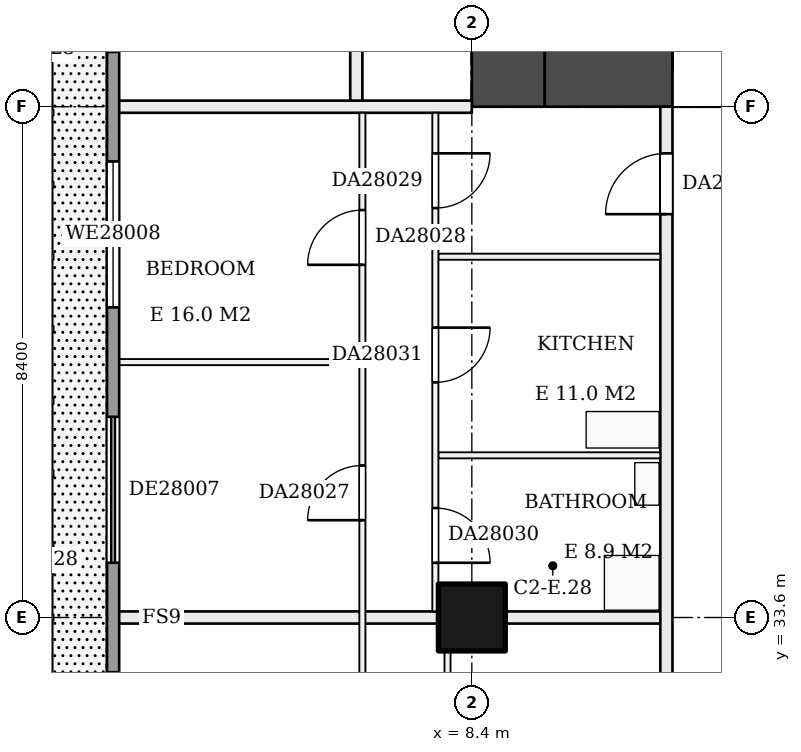
"""IFC4 building model, lengths in metres.
Left out: names, types, materials, properties, quantities, classifications, styles, units other than length and angle.
Written with IfcOpenShell. Run it as: python <this file> out.ifc"""

import sys

from ifc_helpers import new_model, si_unit, direction, frame, frame_2d, origin, origin_2d, place, context, subcontext, project, spatial, rectangle, extrude, element, fill, save


model = new_model("IFC4")
c1 = context("Model", 3, precision=1e-05, world=origin(), true_north=direction((0.0, 1.0)))
c2 = subcontext(c1, "Body", "Model", "MODEL_VIEW")
j1 = project(units=[si_unit("LENGTHUNIT", "METRE"), si_unit("PLANEANGLEUNIT", "RADIAN")], contexts=[c1])
p1 = place(None, origin())
s1 = spatial("IfcSite", under=j1, at=p1, CompositionType="ELEMENT")
p2 = place(p1, origin())
s2 = spatial("IfcBuilding", under=s1, at=p2, CompositionType="ELEMENT")
p3 = place(p2, frame((0.0, 0.0, 112.7)))
s3 = spatial("IfcBuildingStorey", under=s2, at=p3, CompositionType="ELEMENT", Elevation=112.7)
p4 = place(p3, frame((8.4, 33.6, 0.0), z_axis=(0.0, 0.0, 1.0), x_axis=(1.0, 0.0, 0.0)))
e1 = element("IfcColumn", 1, at=p4, inside=s3, PredefinedType="COLUMN", context=c2, shape_type="SweptSolid", body=[
    extrude(rectangle(XDim=1.1, YDim=1.1, at=origin_2d()), origin(), (0.0, 0.0, 1.0), 3.22),
])
p5 = place(p3, frame((9.0, 58.8, 0.0), z_axis=(0.0, 0.0, 1.0), x_axis=(0.0, -1.0, 0.0)))
e2 = element("IfcWall", 2, at=p5, inside=s3, PredefinedType="SHEAR", context=c2, shape_type="SweptSolid", body=[
    extrude(rectangle(XDim=16.8, YDim=1.2, at=frame_2d((8.4, 0.0))), origin(), (0.0, 0.0, 1.0), 3.22),
])
p6 = place(p5, frame((3.1, 0.0, 0.0)))
e3 = element("IfcOpeningElement", 3, at=p6, cuts=e2, PredefinedType="OPENING", context=c2, shape_type="SweptSolid", body=[
    extrude(rectangle(XDim=1.0, YDim=2.1, at=frame_2d((0.5, 1.05))), frame((0.0, 0.61, 0.0), z_axis=(0.0, -1.0, 0.0), x_axis=(1.0, 0.0, 0.0)), (0.0, 0.0, 1.0), 1.22),
])
p7 = place(p5, frame((12.7, 0.0, 0.0)))
e4 = element("IfcOpeningElement", 4, at=p7, cuts=e2, PredefinedType="OPENING", context=c2, shape_type="SweptSolid", body=[
    extrude(rectangle(XDim=1.0, YDim=2.1, at=frame_2d((0.5, 1.05))), frame((0.0, 0.61, 0.0), z_axis=(0.0, -1.0, 0.0), x_axis=(1.0, 0.0, 0.0)), (0.0, 0.0, 1.0), 1.22),
])
p8 = place(p3, frame((9.6, 42.6, 0.0), z_axis=(0.0, 0.0, 1.0), x_axis=(1.0, 0.0, 0.0)))
e5 = element("IfcWall", 5, at=p8, inside=s3, PredefinedType="SHEAR", context=c2, shape_type="SweptSolid", body=[
    extrude(rectangle(XDim=14.4, YDim=1.2, at=frame_2d((7.2, 0.0))), origin(), (0.0, 0.0, 1.0), 3.22),
])
p9 = place(p8, frame((2.1, 0.0, 0.0)))
e6 = element("IfcOpeningElement", 6, at=p9, cuts=e5, PredefinedType="OPENING", context=c2, shape_type="SweptSolid", body=[
    extrude(rectangle(XDim=1.8, YDim=2.1, at=frame_2d((0.9, 1.05))), frame((0.0, 0.61, 0.0), z_axis=(0.0, -1.0, 0.0), x_axis=(1.0, 0.0, 0.0)), (0.0, 0.0, 1.0), 1.22),
])
p10 = place(p3, frame((2.5, 33.6, 0.0), z_axis=(0.0, 0.0, 1.0), x_axis=(1.0, 0.0, 0.0)))
e7 = element("IfcWall", 7, at=p10, inside=s3, PredefinedType="PARTITIONING", context=c2, shape_type="SweptSolid", body=[
    extrude(rectangle(XDim=9.0, YDim=0.2, at=frame_2d((4.5, 0.0))), origin(), (0.0, 0.0, 1.0), 3.22),
])
p11 = place(p3, frame((7.85, 36.267, 0.0), z_axis=(0.0, 0.0, 1.0), x_axis=(1.0, 0.0, 0.0)))
e8 = element("IfcWall", 8, at=p11, inside=s3, PredefinedType="PARTITIONING", context=c2, shape_type="SweptSolid", body=[
    extrude(rectangle(XDim=3.65, YDim=0.1, at=frame_2d((1.825, 0.0))), origin(), (0.0, 0.0, 1.0), 3.22),
])
p12 = place(p3, frame((2.5, 37.8, 0.0), z_axis=(0.0, 0.0, 1.0), x_axis=(1.0, 0.0, 0.0)))
e9 = element("IfcWall", 9, at=p12, inside=s3, PredefinedType="PARTITIONING", context=c2, shape_type="SweptSolid", body=[
    extrude(rectangle(XDim=4.05, YDim=0.1, at=frame_2d((2.025, 0.0))), origin(), (0.0, 0.0, 1.0), 3.22),
])
p13 = place(p3, frame((7.85, 39.533, 0.0), z_axis=(0.0, 0.0, 1.0), x_axis=(1.0, 0.0, 0.0)))
e10 = element("IfcWall", 10, at=p13, inside=s3, PredefinedType="PARTITIONING", context=c2, shape_type="SweptSolid", body=[
    extrude(rectangle(XDim=3.65, YDim=0.1, at=frame_2d((1.825, 0.0))), origin(), (0.0, 0.0, 1.0), 3.22),
])
p14 = place(p3, frame((2.5, 42.0, 0.0), z_axis=(0.0, 0.0, 1.0), x_axis=(1.0, 0.0, 0.0)))
e11 = element("IfcWall", 11, at=p14, inside=s3, PredefinedType="PARTITIONING", context=c2, shape_type="SweptSolid", body=[
    extrude(rectangle(XDim=5.9, YDim=0.2, at=frame_2d((2.95, 0.0))), origin(), (0.0, 0.0, 1.0), 3.22),
])
p15 = place(p3, frame((6.5, 42.1, 0.0), z_axis=(0.0, 0.0, 1.0), x_axis=(0.0, 1.0, 0.0)))
e12 = element("IfcWall", 12, at=p15, inside=s3, PredefinedType="PARTITIONING", context=c2, shape_type="SweptSolid", body=[
    extrude(rectangle(XDim=14.2, YDim=0.2, at=frame_2d((7.1, 0.0))), origin(), (0.0, 0.0, 1.0), 3.22),
])
p16 = place(p15, frame((1.5, 0.0, 0.0)))
e13 = element("IfcOpeningElement", 13, at=p16, cuts=e12, PredefinedType="OPENING", context=c2, shape_type="SweptSolid", body=[
    extrude(rectangle(XDim=1.0, YDim=2.1, at=frame_2d((0.5, 1.05))), frame((0.0, 0.11, 0.0), z_axis=(0.0, -1.0, 0.0), x_axis=(1.0, 0.0, 0.0)), (0.0, 0.0, 1.0), 0.22),
])
p17 = place(p15, frame((6.7, 0.0, 0.0)))
e14 = element("IfcOpeningElement", 14, at=p17, cuts=e12, PredefinedType="OPENING", context=c2, shape_type="SweptSolid", body=[
    extrude(rectangle(XDim=1.0, YDim=2.1, at=frame_2d((0.5, 1.05))), frame((0.0, 0.11, 0.0), z_axis=(0.0, -1.0, 0.0), x_axis=(1.0, 0.0, 0.0)), (0.0, 0.0, 1.0), 0.22),
])
p18 = place(p3, frame((6.6, 16.85, 0.0), z_axis=(0.0, 0.0, 1.0), x_axis=(0.0, 1.0, 0.0)))
e15 = element("IfcWall", 15, at=p18, inside=s3, PredefinedType="PARTITIONING", context=c2, shape_type="SweptSolid", body=[
    extrude(rectangle(XDim=25.05, YDim=0.1, at=frame_2d((12.525, 0.0))), origin(), (0.0, 0.0, 1.0), 3.22),
])
p19 = place(p18, frame((1.55, 0.0, 0.0)))
e16 = element("IfcOpeningElement", 16, at=p19, cuts=e15, PredefinedType="OPENING", context=c2, shape_type="SweptSolid", body=[
    extrude(rectangle(XDim=0.9, YDim=2.1, at=frame_2d((0.45, 1.05))), frame((0.0, 0.06, 0.0), z_axis=(0.0, -1.0, 0.0), x_axis=(1.0, 0.0, 0.0)), (0.0, 0.0, 1.0), 0.12),
])
p20 = place(p18, frame((7.15, 0.0, 0.0)))
e17 = element("IfcOpeningElement", 17, at=p20, cuts=e15, PredefinedType="OPENING", context=c2, shape_type="SweptSolid", body=[
    extrude(rectangle(XDim=0.9, YDim=2.1, at=frame_2d((0.45, 1.05))), frame((0.0, 0.06, 0.0), z_axis=(0.0, -1.0, 0.0), x_axis=(1.0, 0.0, 0.0)), (0.0, 0.0, 1.0), 0.12),
])
p21 = place(p18, frame((14.15, 0.0, 0.0)))
e18 = element("IfcOpeningElement", 18, at=p21, cuts=e15, PredefinedType="OPENING", context=c2, shape_type="SweptSolid", body=[
    extrude(rectangle(XDim=0.9, YDim=2.1, at=frame_2d((0.45, 1.05))), frame((0.0, 0.06, 0.0), z_axis=(0.0, -1.0, 0.0), x_axis=(1.0, 0.0, 0.0)), (0.0, 0.0, 1.0), 0.12),
])
p22 = place(p18, frame((18.35, 0.0, 0.0)))
e19 = element("IfcOpeningElement", 19, at=p22, cuts=e15, PredefinedType="OPENING", context=c2, shape_type="SweptSolid", body=[
    extrude(rectangle(XDim=0.9, YDim=2.1, at=frame_2d((0.45, 1.05))), frame((0.0, 0.06, 0.0), z_axis=(0.0, -1.0, 0.0), x_axis=(1.0, 0.0, 0.0)), (0.0, 0.0, 1.0), 0.12),
])
p23 = place(p18, frame((22.55, 0.0, 0.0)))
e20 = element("IfcOpeningElement", 20, at=p23, cuts=e15, PredefinedType="OPENING", context=c2, shape_type="SweptSolid", body=[
    extrude(rectangle(XDim=0.9, YDim=2.1, at=frame_2d((0.45, 1.05))), frame((0.0, 0.06, 0.0), z_axis=(0.0, -1.0, 0.0), x_axis=(1.0, 0.0, 0.0)), (0.0, 0.0, 1.0), 0.12),
])
p24 = place(p3, frame((7.8, 33.7, 0.0), z_axis=(0.0, 0.0, 1.0), x_axis=(0.0, 1.0, 0.0)))
e21 = element("IfcWall", 21, at=p24, inside=s3, PredefinedType="PARTITIONING", context=c2, shape_type="SweptSolid", body=[
    extrude(rectangle(XDim=8.2, YDim=0.1, at=frame_2d((4.1, 0.0))), origin(), (0.0, 0.0, 1.0), 3.22),
])
p25 = place(p24, frame((6.633, 0.0, 0.0)))
e22 = element("IfcOpeningElement", 22, at=p25, cuts=e21, PredefinedType="OPENING", context=c2, shape_type="SweptSolid", body=[
    extrude(rectangle(XDim=0.9, YDim=2.1, at=frame_2d((0.45, 1.05))), frame((0.0, 0.06, 0.0), z_axis=(0.0, -1.0, 0.0), x_axis=(1.0, 0.0, 0.0)), (0.0, 0.0, 1.0), 0.12),
])
p26 = place(p24, frame((0.8, 0.0, 0.0)))
e23 = element("IfcOpeningElement", 23, at=p26, cuts=e21, PredefinedType="OPENING", context=c2, shape_type="SweptSolid", body=[
    extrude(rectangle(XDim=0.9, YDim=2.1, at=frame_2d((0.45, 1.05))), frame((0.0, 0.06, 0.0), z_axis=(0.0, -1.0, 0.0), x_axis=(1.0, 0.0, 0.0)), (0.0, 0.0, 1.0), 0.12),
])
p27 = place(p24, frame((3.767, 0.0, 0.0)))
e24 = element("IfcOpeningElement", 24, at=p27, cuts=e21, PredefinedType="OPENING", context=c2, shape_type="SweptSolid", body=[
    extrude(rectangle(XDim=0.9, YDim=2.1, at=frame_2d((0.45, 1.05))), frame((0.0, 0.06, 0.0), z_axis=(0.0, -1.0, 0.0), x_axis=(1.0, 0.0, 0.0)), (0.0, 0.0, 1.0), 0.12),
])
p28 = place(p3, frame((8.0, 16.85, 0.0), z_axis=(0.0, 0.0, 1.0), x_axis=(0.0, 1.0, 0.0)))
e25 = element("IfcWall", 25, at=p28, inside=s3, PredefinedType="PARTITIONING", context=c2, shape_type="SweptSolid", body=[
    extrude(rectangle(XDim=16.65, YDim=0.1, at=frame_2d((8.325, 0.0))), origin(), (0.0, 0.0, 1.0), 3.22),
])
p29 = place(p28, frame((0.75, 0.0, 0.0)))
e26 = element("IfcOpeningElement", 26, at=p29, cuts=e25, PredefinedType="OPENING", context=c2, shape_type="SweptSolid", body=[
    extrude(rectangle(XDim=0.9, YDim=2.1, at=frame_2d((0.45, 1.05))), frame((0.0, 0.06, 0.0), z_axis=(0.0, -1.0, 0.0), x_axis=(1.0, 0.0, 0.0)), (0.0, 0.0, 1.0), 0.12),
])
p30 = place(p28, frame((2.45, 0.0, 0.0)))
e27 = element("IfcOpeningElement", 27, at=p30, cuts=e25, PredefinedType="OPENING", context=c2, shape_type="SweptSolid", body=[
    extrude(rectangle(XDim=0.9, YDim=2.1, at=frame_2d((0.45, 1.05))), frame((0.0, 0.06, 0.0), z_axis=(0.0, -1.0, 0.0), x_axis=(1.0, 0.0, 0.0)), (0.0, 0.0, 1.0), 0.12),
])
p31 = place(p28, frame((9.075, 0.0, 0.0)))
e28 = element("IfcOpeningElement", 28, at=p31, cuts=e25, PredefinedType="OPENING", context=c2, shape_type="SweptSolid", body=[
    extrude(rectangle(XDim=0.9, YDim=2.1, at=frame_2d((0.45, 1.05))), frame((0.0, 0.06, 0.0), z_axis=(0.0, -1.0, 0.0), x_axis=(1.0, 0.0, 0.0)), (0.0, 0.0, 1.0), 0.12),
])
p32 = place(p28, frame((5.25, 0.0, 0.0)))
e29 = element("IfcOpeningElement", 29, at=p32, cuts=e25, PredefinedType="OPENING", context=c2, shape_type="SweptSolid", body=[
    extrude(rectangle(XDim=0.9, YDim=2.1, at=frame_2d((0.45, 1.05))), frame((0.0, 0.06, 0.0), z_axis=(0.0, -1.0, 0.0), x_axis=(1.0, 0.0, 0.0)), (0.0, 0.0, 1.0), 0.12),
])
p33 = place(p28, frame((11.2, 0.0, 0.0)))
e30 = element("IfcOpeningElement", 30, at=p33, cuts=e25, PredefinedType="OPENING", context=c2, shape_type="SweptSolid", body=[
    extrude(rectangle(XDim=0.9, YDim=2.1, at=frame_2d((0.45, 1.05))), frame((0.0, 0.06, 0.0), z_axis=(0.0, -1.0, 0.0), x_axis=(1.0, 0.0, 0.0)), (0.0, 0.0, 1.0), 0.12),
])
p34 = place(p28, frame((14.425, 0.0, 0.0)))
e31 = element("IfcOpeningElement", 31, at=p34, cuts=e25, PredefinedType="OPENING", context=c2, shape_type="SweptSolid", body=[
    extrude(rectangle(XDim=0.9, YDim=2.1, at=frame_2d((0.45, 1.05))), frame((0.0, 0.06, 0.0), z_axis=(0.0, -1.0, 0.0), x_axis=(1.0, 0.0, 0.0)), (0.0, 0.0, 1.0), 0.12),
])
p35 = place(p3, frame((11.6, 10.9, 0.0), z_axis=(0.0, 0.0, 1.0), x_axis=(0.0, 1.0, 0.0)))
e32 = element("IfcWall", 32, at=p35, inside=s3, PredefinedType="PARTITIONING", context=c2, shape_type="SweptSolid", body=[
    extrude(rectangle(XDim=31.1, YDim=0.2, at=frame_2d((15.55, 0.0))), origin(), (0.0, 0.0, 1.0), 3.22),
])
p36 = place(p35, frame((6.3, 0.0, 0.0)))
e33 = element("IfcOpeningElement", 33, at=p36, cuts=e32, PredefinedType="OPENING", context=c2, shape_type="SweptSolid", body=[
    extrude(rectangle(XDim=1.0, YDim=2.1, at=frame_2d((0.5, 1.05))), frame((0.0, 0.11, 0.0), z_axis=(0.0, -1.0, 0.0), x_axis=(1.0, 0.0, 0.0)), (0.0, 0.0, 1.0), 0.22),
])
p37 = place(p35, frame((14.225, 0.0, 0.0)))
e34 = element("IfcOpeningElement", 34, at=p37, cuts=e32, PredefinedType="OPENING", context=c2, shape_type="SweptSolid", body=[
    extrude(rectangle(XDim=1.0, YDim=2.1, at=frame_2d((0.5, 1.05))), frame((0.0, 0.11, 0.0), z_axis=(0.0, -1.0, 0.0), x_axis=(1.0, 0.0, 0.0)), (0.0, 0.0, 1.0), 0.22),
])
p38 = place(p35, frame((29.333, 0.0, 0.0)))
e35 = element("IfcOpeningElement", 35, at=p38, cuts=e32, PredefinedType="OPENING", context=c2, shape_type="SweptSolid", body=[
    extrude(rectangle(XDim=1.0, YDim=2.1, at=frame_2d((0.5, 1.05))), frame((0.0, 0.11, 0.0), z_axis=(0.0, -1.0, 0.0), x_axis=(1.0, 0.0, 0.0)), (0.0, 0.0, 1.0), 0.22),
])
p39 = place(p3, frame((2.5, 53.8, 0.0), z_axis=(0.0, 0.0, 1.0), x_axis=(0.0, -1.0, 0.0)))
e36 = element("IfcWall", 36, at=p39, inside=s3, PredefinedType="SOLIDWALL", context=c2, shape_type="SweptSolid", body=[
    extrude(rectangle(XDim=40.4, YDim=0.2, at=frame_2d((20.2, 0.0))), origin(), (0.0, 0.0, 1.0), 3.22),
])
p40 = place(p39, frame((37.7, 0.0, 0.9)))
e37 = element("IfcOpeningElement", 37, at=p40, cuts=e36, PredefinedType="OPENING", context=c2, shape_type="SweptSolid", body=[
    extrude(rectangle(XDim=2.4, YDim=1.5, at=frame_2d((1.2, 0.75))), frame((0.0, 0.11, 0.0), z_axis=(0.0, -1.0, 0.0), x_axis=(1.0, 0.0, 0.0)), (0.0, 0.0, 1.0), 0.22),
])
p41 = place(p39, frame((33.7, 0.0, 0.9)))
e38 = element("IfcOpeningElement", 38, at=p41, cuts=e36, PredefinedType="OPENING", context=c2, shape_type="SweptSolid", body=[
    extrude(rectangle(XDim=2.4, YDim=1.5, at=frame_2d((1.2, 0.75))), frame((0.0, 0.11, 0.0), z_axis=(0.0, -1.0, 0.0), x_axis=(1.0, 0.0, 0.0)), (0.0, 0.0, 1.0), 0.22),
])
p42 = place(p39, frame((29.5, 0.0, 0.0)))
e39 = element("IfcOpeningElement", 39, at=p42, cuts=e36, PredefinedType="OPENING", context=c2, shape_type="SweptSolid", body=[
    extrude(rectangle(XDim=2.4, YDim=2.2, at=frame_2d((1.2, 1.1))), frame((0.0, 0.11, 0.0), z_axis=(0.0, -1.0, 0.0), x_axis=(1.0, 0.0, 0.0)), (0.0, 0.0, 1.0), 0.22),
])
p43 = place(p39, frame((25.3, 0.0, 0.0)))
e40 = element("IfcOpeningElement", 40, at=p43, cuts=e36, PredefinedType="OPENING", context=c2, shape_type="SweptSolid", body=[
    extrude(rectangle(XDim=2.4, YDim=2.2, at=frame_2d((1.2, 1.1))), frame((0.0, 0.11, 0.0), z_axis=(0.0, -1.0, 0.0), x_axis=(1.0, 0.0, 0.0)), (0.0, 0.0, 1.0), 0.22),
])
p44 = place(p39, frame((21.1, 0.0, 0.9)))
e41 = element("IfcOpeningElement", 41, at=p44, cuts=e36, PredefinedType="OPENING", context=c2, shape_type="SweptSolid", body=[
    extrude(rectangle(XDim=2.4, YDim=1.5, at=frame_2d((1.2, 0.75))), frame((0.0, 0.11, 0.0), z_axis=(0.0, -1.0, 0.0), x_axis=(1.0, 0.0, 0.0)), (0.0, 0.0, 1.0), 0.22),
])
p45 = place(p39, frame((16.9, 0.0, 0.0)))
e42 = element("IfcOpeningElement", 42, at=p45, cuts=e36, PredefinedType="OPENING", context=c2, shape_type="SweptSolid", body=[
    extrude(rectangle(XDim=2.4, YDim=2.2, at=frame_2d((1.2, 1.1))), frame((0.0, 0.11, 0.0), z_axis=(0.0, -1.0, 0.0), x_axis=(1.0, 0.0, 0.0)), (0.0, 0.0, 1.0), 0.22),
])
p46 = place(p39, frame((12.7, 0.0, 0.9)))
e43 = element("IfcOpeningElement", 43, at=p46, cuts=e36, PredefinedType="OPENING", context=c2, shape_type="SweptSolid", body=[
    extrude(rectangle(XDim=2.4, YDim=1.5, at=frame_2d((1.2, 0.75))), frame((0.0, 0.11, 0.0), z_axis=(0.0, -1.0, 0.0), x_axis=(1.0, 0.0, 0.0)), (0.0, 0.0, 1.0), 0.22),
])
p47 = place(p39, frame((8.5, 0.0, 0.9)))
e44 = element("IfcOpeningElement", 44, at=p47, cuts=e36, PredefinedType="OPENING", context=c2, shape_type="SweptSolid", body=[
    extrude(rectangle(XDim=2.4, YDim=1.5, at=frame_2d((1.2, 0.75))), frame((0.0, 0.11, 0.0), z_axis=(0.0, -1.0, 0.0), x_axis=(1.0, 0.0, 0.0)), (0.0, 0.0, 1.0), 0.22),
])
p48 = place(p39, frame((4.3, 0.0, 0.9)))
e45 = element("IfcOpeningElement", 45, at=p48, cuts=e36, PredefinedType="OPENING", context=c2, shape_type="SweptSolid", body=[
    extrude(rectangle(XDim=2.4, YDim=1.5, at=frame_2d((1.2, 0.75))), frame((0.0, 0.11, 0.0), z_axis=(0.0, -1.0, 0.0), x_axis=(1.0, 0.0, 0.0)), (0.0, 0.0, 1.0), 0.22),
])
p49 = place(p39, frame((0.3, 0.0, 0.0)))
e46 = element("IfcOpeningElement", 46, at=p49, cuts=e36, PredefinedType="OPENING", context=c2, shape_type="SweptSolid", body=[
    extrude(rectangle(XDim=2.4, YDim=2.2, at=frame_2d((1.2, 1.1))), frame((0.0, 0.11, 0.0), z_axis=(0.0, -1.0, 0.0), x_axis=(1.0, 0.0, 0.0)), (0.0, 0.0, 1.0), 0.22),
])
p50 = place(p9, origin())
e47 = element("IfcDoor", 47, at=p50, inside=s3, OperationType="DOUBLE_DOOR_SINGLE_SWING", PredefinedType="DOOR", context=c2, shape_type="SweptSolid", body=[
    extrude(rectangle(XDim=1.8, YDim=2.1, at=frame_2d((0.9, 1.05))), frame((0.0, 0.025, 0.0), z_axis=(0.0, -1.0, 0.0), x_axis=(1.0, 0.0, 0.0)), (0.0, 0.0, 1.0), 0.05),
])
fill(e6, e47)
p51 = place(p22, origin())
e48 = element("IfcDoor", 48, at=p51, inside=s3, OperationType="SINGLE_SWING_LEFT", PredefinedType="DOOR", context=c2, shape_type="SweptSolid", body=[
    extrude(rectangle(XDim=0.9, YDim=2.1, at=frame_2d((0.45, 1.05))), frame((0.0, 0.025, 0.0), z_axis=(0.0, -1.0, 0.0), x_axis=(1.0, 0.0, 0.0)), (0.0, 0.0, 1.0), 0.05),
])
fill(e19, e48)
p52 = place(p23, origin())
e49 = element("IfcDoor", 49, at=p52, inside=s3, OperationType="SINGLE_SWING_LEFT", PredefinedType="DOOR", context=c2, shape_type="SweptSolid", body=[
    extrude(rectangle(XDim=0.9, YDim=2.1, at=frame_2d((0.45, 1.05))), frame((0.0, 0.025, 0.0), z_axis=(0.0, -1.0, 0.0), x_axis=(1.0, 0.0, 0.0)), (0.0, 0.0, 1.0), 0.05),
])
fill(e20, e49)
p53 = place(p25, frame((0.9, 0.0, 0.0), z_axis=(0.0, 0.0, 1.0), x_axis=(-1.0, 0.0, 0.0)))
e50 = element("IfcDoor", 50, at=p53, inside=s3, OperationType="SINGLE_SWING_LEFT", PredefinedType="DOOR", context=c2, shape_type="SweptSolid", body=[
    extrude(rectangle(XDim=0.9, YDim=2.1, at=frame_2d((0.45, 1.05))), frame((0.0, 0.025, 0.0), z_axis=(0.0, -1.0, 0.0), x_axis=(1.0, 0.0, 0.0)), (0.0, 0.0, 1.0), 0.05),
])
fill(e22, e50)
p54 = place(p26, frame((0.9, 0.0, 0.0), z_axis=(0.0, 0.0, 1.0), x_axis=(-1.0, 0.0, 0.0)))
e51 = element("IfcDoor", 51, at=p54, inside=s3, OperationType="SINGLE_SWING_RIGHT", PredefinedType="DOOR", context=c2, shape_type="SweptSolid", body=[
    extrude(rectangle(XDim=0.9, YDim=2.1, at=frame_2d((0.45, 1.05))), frame((0.0, 0.025, 0.0), z_axis=(0.0, -1.0, 0.0), x_axis=(1.0, 0.0, 0.0)), (0.0, 0.0, 1.0), 0.05),
])
fill(e23, e51)
p55 = place(p27, frame((0.9, 0.0, 0.0), z_axis=(0.0, 0.0, 1.0), x_axis=(-1.0, 0.0, 0.0)))
e52 = element("IfcDoor", 52, at=p55, inside=s3, OperationType="SINGLE_SWING_LEFT", PredefinedType="DOOR", context=c2, shape_type="SweptSolid", body=[
    extrude(rectangle(XDim=0.9, YDim=2.1, at=frame_2d((0.45, 1.05))), frame((0.0, 0.025, 0.0), z_axis=(0.0, -1.0, 0.0), x_axis=(1.0, 0.0, 0.0)), (0.0, 0.0, 1.0), 0.05),
])
fill(e24, e52)
p56 = place(p38, origin())
e53 = element("IfcDoor", 53, at=p56, inside=s3, OperationType="SINGLE_SWING_LEFT", PredefinedType="DOOR", context=c2, shape_type="SweptSolid", body=[
    extrude(rectangle(XDim=1.0, YDim=2.1, at=frame_2d((0.5, 1.05))), frame((0.0, 0.025, 0.0), z_axis=(0.0, -1.0, 0.0), x_axis=(1.0, 0.0, 0.0)), (0.0, 0.0, 1.0), 0.05),
])
fill(e35, e53)
p57 = place(p45, origin())
e54 = element("IfcDoor", 54, at=p57, inside=s3, OperationType="DOUBLE_DOOR_SLIDING", PredefinedType="DOOR", context=c2, shape_type="SweptSolid", body=[
    extrude(rectangle(XDim=2.4, YDim=2.2, at=frame_2d((1.2, 1.1))), frame((0.0, 0.025, 0.0), z_axis=(0.0, -1.0, 0.0), x_axis=(1.0, 0.0, 0.0)), (0.0, 0.0, 1.0), 0.05),
])
fill(e42, e54)
p58 = place(p46, origin())
e55 = element("IfcWindow", 55, at=p58, inside=s3, PartitioningType="SINGLE_PANEL", PredefinedType="WINDOW", context=c2, shape_type="SweptSolid", body=[
    extrude(rectangle(XDim=2.4, YDim=1.5, at=frame_2d((1.2, 0.75))), frame((0.0, 0.03, 0.0), z_axis=(0.0, -1.0, 0.0), x_axis=(1.0, 0.0, 0.0)), (0.0, 0.0, 1.0), 0.06),
])
fill(e43, e55)
save(model, sys.argv[1])
